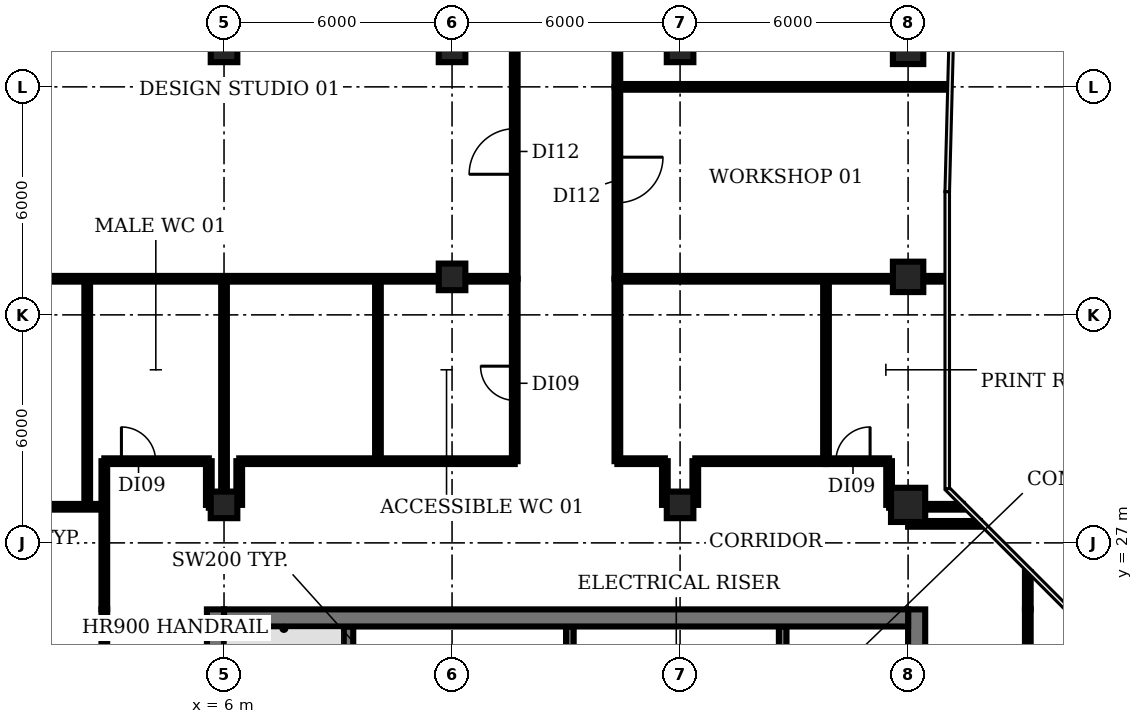
"""IFC4 building model, lengths in metres.
Left out: names, types, materials, properties, quantities, classifications, styles, units other than length and angle.
Written with IfcOpenShell. Run it as: python <this file> out.ifc"""

import sys

from ifc_helpers import new_model, si_unit, direction, frame, frame_2d, origin, origin_2d, place, context, subcontext, project, spatial, rectangle, circle, extrude, element, fill, save


model = new_model("IFC4")
c1 = context("Model", 3, precision=1e-05, world=origin(), true_north=direction((0.0, 1.0)))
c2 = subcontext(c1, "Body", "Model", "MODEL_VIEW")
j1 = project(units=[si_unit("LENGTHUNIT", "METRE"), si_unit("PLANEANGLEUNIT", "RADIAN")], contexts=[c1])
p1 = place(None, origin())
s1 = spatial("IfcSite", under=j1, at=p1, CompositionType="ELEMENT")
p2 = place(p1, origin())
s2 = spatial("IfcBuilding", under=s1, at=p2, CompositionType="ELEMENT")
p3 = place(p2, frame((0.0, 0.0, 234.8)))
s3 = spatial("IfcBuildingStorey", under=s2, at=p3, CompositionType="ELEMENT", Elevation=234.8)
for number, where, z_axis, x_axis in (
    (1, (6.0, 28.0, 0.0), (0.0, 0.0, 1.0), (1.0, 0.0, 0.0)),
    (2, (6.0, 40.0, 0.0), (0.0, 0.0, 1.0), (1.0, 0.0, 0.0)),
    (3, (12.0, 34.0, 0.0), (0.0, 0.0, 1.0), (1.0, 0.0, 0.0)),
    (4, (12.0, 40.0, 0.0), (0.0, 0.0, 1.0), (1.0, 0.0, 0.0)),
    (5, (18.0, 28.0, 0.0), (0.0, 0.0, 1.0), (1.0, 0.0, 0.0)),
    (6, (18.0, 40.0, 0.0), (0.0, 0.0, 1.0), (1.0, 0.0, 0.0)),
):
    element("IfcColumn", number, at=place(p3, frame(where, z_axis=z_axis, x_axis=x_axis)), inside=s3, PredefinedType="COLUMN", context=c2, shape_type="SweptSolid", body=[
        extrude(rectangle(XDim=0.7, YDim=0.7, at=origin_2d()), origin(), (0.0, 0.0, 1.0), 3.85),
    ])
p4 = place(p3, frame((24.0, 28.0, 0.0), z_axis=(0.0, 0.0, 1.0), x_axis=(1.0, 0.0, 0.0)))
e7 = element("IfcColumn", 7, at=p4, inside=s3, PredefinedType="COLUMN", context=c2, shape_type="SweptSolid", body=[
    extrude(circle(Radius=0.45, at=origin_2d()), origin(), (0.0, 0.0, 1.0), 3.85),
])
for number, where, z_axis, x_axis in (
    (8, (24.0, 34.0, 0.0), (0.0, 0.0, 1.0), (1.0, 0.0, 0.0)),
    (9, (24.0, 40.0, 0.0), (0.0, 0.0, 1.0), (1.0, 0.0, 0.0)),
):
    element("IfcColumn", number, at=place(p3, frame(where, z_axis=z_axis, x_axis=x_axis)), inside=s3, PredefinedType="COLUMN", context=c2, shape_type="SweptSolid", body=[
        extrude(rectangle(XDim=0.8, YDim=0.8, at=origin_2d()), origin(), (0.0, 0.0, 1.0), 3.85),
    ])
p5 = place(p3, frame((9.275, 18.375, 0.0), z_axis=(0.0, 0.0, 1.0), x_axis=(0.0, 1.0, 0.0)))
e10 = element("IfcWall", 10, at=p5, inside=s3, PredefinedType="SHEAR", context=c2, shape_type="SweptSolid", body=[
    extrude(rectangle(XDim=6.425, YDim=0.25, at=frame_2d((3.212, 0.0))), origin(), (0.0, 0.0, 1.0), 3.85),
])
for number, where, z_axis, x_axis in (
    (11, (15.1, 22.9, 0.0), (0.0, 0.0, 1.0), (0.0, 1.0, 0.0)),
    (12, (20.7, 22.9, 0.0), (0.0, 0.0, 1.0), (0.0, 1.0, 0.0)),
):
    element("IfcWall", number, at=place(p3, frame(where, z_axis=z_axis, x_axis=x_axis)), inside=s3, PredefinedType="SHEAR", context=c2, shape_type="SweptSolid", body=[
        extrude(rectangle(XDim=1.9, YDim=0.2, at=frame_2d((0.95, 0.0))), origin(), (0.0, 0.0, 1.0), 3.85),
    ])
p6 = place(p3, frame((5.775, 4.42, 0.0), z_axis=(0.0, 0.0, 1.0), x_axis=(0.0, 1.0, 0.0)))
e13 = element("IfcWall", 13, at=p6, inside=s3, PredefinedType="SHEAR", context=c2, shape_type="SweptSolid", body=[
    extrude(rectangle(XDim=20.83, YDim=0.45, at=frame_2d((10.415, 0.0))), origin(), (0.0, 0.0, 1.0), 3.85),
])
p7 = place(p6, frame((1.23, 0.0, 0.0)))
e14 = element("IfcOpeningElement", 14, at=p7, cuts=e13, PredefinedType="OPENING", context=c2, shape_type="SweptSolid", body=[
    extrude(rectangle(XDim=1.5, YDim=2.1, at=frame_2d((0.75, 1.05))), frame((0.0, 0.235, 0.0), z_axis=(0.0, -1.0, 0.0), x_axis=(1.0, 0.0, 0.0)), (0.0, 0.0, 1.0), 0.47),
])
p8 = place(p6, frame((7.68, 0.0, 0.0)))
e15 = element("IfcOpeningElement", 15, at=p8, cuts=e13, PredefinedType="OPENING", context=c2, shape_type="SweptSolid", body=[
    extrude(rectangle(XDim=1.2, YDim=2.1, at=frame_2d((0.6, 1.05))), frame((0.0, 0.235, 0.0), z_axis=(0.0, -1.0, 0.0), x_axis=(1.0, 0.0, 0.0)), (0.0, 0.0, 1.0), 0.47),
])
p9 = place(p6, frame((14.23, 0.0, 0.0)))
e16 = element("IfcOpeningElement", 16, at=p9, cuts=e13, PredefinedType="OPENING", context=c2, shape_type="SweptSolid", body=[
    extrude(rectangle(XDim=1.2, YDim=2.1, at=frame_2d((0.6, 1.05))), frame((0.0, 0.235, 0.0), z_axis=(0.0, -1.0, 0.0), x_axis=(1.0, 0.0, 0.0)), (0.0, 0.0, 1.0), 0.47),
])
p10 = place(p3, frame((24.225, 25.25, 0.0), z_axis=(0.0, 0.0, 1.0), x_axis=(0.0, -1.0, 0.0)))
e17 = element("IfcWall", 17, at=p10, inside=s3, PredefinedType="SHEAR", context=c2, shape_type="SweptSolid", body=[
    extrude(rectangle(XDim=20.83, YDim=0.45, at=frame_2d((10.415, 0.0))), origin(), (0.0, 0.0, 1.0), 3.85),
])
p11 = place(p10, frame((18.1, 0.0, 0.0)))
e18 = element("IfcOpeningElement", 18, at=p11, cuts=e17, PredefinedType="OPENING", context=c2, shape_type="SweptSolid", body=[
    extrude(rectangle(XDim=1.5, YDim=2.1, at=frame_2d((0.75, 1.05))), frame((0.0, 0.235, 0.0), z_axis=(0.0, -1.0, 0.0), x_axis=(1.0, 0.0, 0.0)), (0.0, 0.0, 1.0), 0.47),
])
p12 = place(p10, frame((12.0, 0.0, 0.0)))
e19 = element("IfcOpeningElement", 19, at=p12, cuts=e17, PredefinedType="OPENING", context=c2, shape_type="SweptSolid", body=[
    extrude(rectangle(XDim=0.9, YDim=2.1, at=frame_2d((0.45, 1.05))), frame((0.0, 0.235, 0.0), z_axis=(0.0, -1.0, 0.0), x_axis=(1.0, 0.0, 0.0)), (0.0, 0.0, 1.0), 0.47),
])
p13 = place(p10, frame((6.0, 0.0, 0.0)))
e20 = element("IfcOpeningElement", 20, at=p13, cuts=e17, PredefinedType="OPENING", context=c2, shape_type="SweptSolid", body=[
    extrude(rectangle(XDim=2.0, YDim=2.1, at=frame_2d((1.0, 1.05))), frame((0.0, 0.235, 0.0), z_axis=(0.0, -1.0, 0.0), x_axis=(1.0, 0.0, 0.0)), (0.0, 0.0, 1.0), 0.47),
])
p14 = place(p3, frame((6.0, 25.025, 0.0), z_axis=(0.0, 0.0, 1.0), x_axis=(1.0, 0.0, 0.0)))
e21 = element("IfcWall", 21, at=p14, inside=s3, PredefinedType="SHEAR", context=c2, shape_type="SweptSolid", body=[
    extrude(rectangle(XDim=18.0, YDim=0.45, at=frame_2d((9.0, 0.0))), origin(), (0.0, 0.0, 1.0), 3.85),
])
p15 = place(p3, frame((-1.21, 27.95, 0.0), z_axis=(0.0, 0.0, 1.0), x_axis=(1.0, 0.0, 0.0)))
e22 = element("IfcWall", 22, at=p15, inside=s3, PredefinedType="PARTITIONING", context=c2, shape_type="SweptSolid", body=[
    extrude(rectangle(XDim=4.06, YDim=0.15, at=frame_2d((2.03, 0.0))), origin(), (0.0, 0.0, 1.0), 2.88),
])
p16 = place(p3, frame((-1.05, 33.95, 0.0), z_axis=(0.0, 0.0, 1.0), x_axis=(1.0, 0.0, 0.0)))
e23 = element("IfcWall", 23, at=p16, inside=s3, PredefinedType="PARTITIONING", context=c2, shape_type="SweptSolid", body=[
    extrude(rectangle(XDim=14.7, YDim=0.15, at=frame_2d((7.35, 0.0))), origin(), (0.0, 0.0, 1.0), 2.88),
])
p17 = place(p3, frame((2.4, 27.95, 0.0), z_axis=(0.0, 0.0, 1.0), x_axis=(0.0, 1.0, 0.0)))
e24 = element("IfcWall", 24, at=p17, inside=s3, PredefinedType="PARTITIONING", context=c2, shape_type="SweptSolid", body=[
    extrude(rectangle(XDim=6.0, YDim=0.15, at=frame_2d((3.0, 0.0))), origin(), (0.0, 0.0, 1.0), 2.88),
])
p18 = place(p3, frame((2.85, 5.23, 0.0), z_axis=(0.0, 0.0, 1.0), x_axis=(0.0, 1.0, 0.0)))
e25 = element("IfcWall", 25, at=p18, inside=s3, PredefinedType="PARTITIONING", context=c2, shape_type="SweptSolid", body=[
    extrude(rectangle(XDim=20.02, YDim=0.15, at=frame_2d((10.01, 0.0))), origin(), (0.0, 0.0, 1.0), 2.88),
])
p19 = place(p18, frame((9.02, 0.0, 0.0)))
e26 = element("IfcOpeningElement", 26, at=p19, cuts=e25, PredefinedType="OPENING", context=c2, shape_type="SweptSolid", body=[
    extrude(rectangle(XDim=1.2, YDim=2.1, at=frame_2d((0.6, 1.05))), frame((0.0, 0.085, 0.0), z_axis=(0.0, -1.0, 0.0), x_axis=(1.0, 0.0, 0.0)), (0.0, 0.0, 1.0), 0.17),
])
p20 = place(p3, frame((2.85, 25.25, 0.0), z_axis=(0.0, 0.0, 1.0), x_axis=(0.0, 1.0, 0.0)))
e27 = element("IfcWall", 27, at=p20, inside=s3, PredefinedType="PARTITIONING", context=c2, shape_type="SweptSolid", body=[
    extrude(rectangle(XDim=3.9, YDim=0.15, at=frame_2d((1.95, 0.0))), origin(), (0.0, 0.0, 1.0), 2.88),
])
p21 = place(p3, frame((2.85, 29.15, 0.0), z_axis=(0.0, 0.0, 1.0), x_axis=(1.0, 0.0, 0.0)))
e28 = element("IfcWall", 28, at=p21, inside=s3, PredefinedType="PARTITIONING", context=c2, shape_type="SweptSolid", body=[
    extrude(rectangle(XDim=2.75, YDim=0.15, at=frame_2d((1.375, 0.0))), origin(), (0.0, 0.0, 1.0), 2.88),
])
p22 = place(p21, frame((0.45, 0.0, 0.0)))
e29 = element("IfcOpeningElement", 29, at=p22, cuts=e28, PredefinedType="OPENING", context=c2, shape_type="SweptSolid", body=[
    extrude(rectangle(XDim=0.9, YDim=2.1, at=frame_2d((0.45, 1.05))), frame((0.0, 0.085, 0.0), z_axis=(0.0, -1.0, 0.0), x_axis=(1.0, 0.0, 0.0)), (0.0, 0.0, 1.0), 0.17),
])
p23 = place(p3, frame((5.6, 28.0, 0.0), z_axis=(0.0, 0.0, 1.0), x_axis=(0.0, 1.0, 0.0)))
e30 = element("IfcWall", 30, at=p23, inside=s3, PredefinedType="PARTITIONING", context=c2, shape_type="SweptSolid", body=[
    extrude(rectangle(XDim=1.15, YDim=0.15, at=frame_2d((0.575, 0.0))), origin(), (0.0, 0.0, 1.0), 2.88),
])
p24 = place(p3, frame((5.6, 28.0, 0.0), z_axis=(0.0, 0.0, 1.0), x_axis=(1.0, 0.0, 0.0)))
e31 = element("IfcWall", 31, at=p24, inside=s3, PredefinedType="PARTITIONING", context=c2, shape_type="SweptSolid", body=[
    extrude(rectangle(XDim=0.4, YDim=0.15, at=frame_2d((0.2, 0.0))), origin(), (0.0, 0.0, 1.0), 2.88),
])
p25 = place(p3, frame((6.0, 28.0, 0.0), z_axis=(0.0, 0.0, 1.0), x_axis=(0.0, 1.0, 0.0)))
e32 = element("IfcWall", 32, at=p25, inside=s3, PredefinedType="PARTITIONING", context=c2, shape_type="SweptSolid", body=[
    extrude(rectangle(XDim=5.95, YDim=0.15, at=frame_2d((2.975, 0.0))), origin(), (0.0, 0.0, 1.0), 2.88),
])
p26 = place(p3, frame((6.4, 28.0, 0.0), z_axis=(0.0, 0.0, 1.0), x_axis=(0.0, 1.0, 0.0)))
e33 = element("IfcWall", 33, at=p26, inside=s3, PredefinedType="PARTITIONING", context=c2, shape_type="SweptSolid", body=[
    extrude(rectangle(XDim=1.15, YDim=0.15, at=frame_2d((0.575, 0.0))), origin(), (0.0, 0.0, 1.0), 2.88),
])
p27 = place(p3, frame((6.4, 29.15, 0.0), z_axis=(0.0, 0.0, 1.0), x_axis=(1.0, 0.0, 0.0)))
e34 = element("IfcWall", 34, at=p27, inside=s3, PredefinedType="PARTITIONING", context=c2, shape_type="SweptSolid", body=[
    extrude(rectangle(XDim=7.25, YDim=0.15, at=frame_2d((3.625, 0.0))), origin(), (0.0, 0.0, 1.0), 2.88),
])
p28 = place(p3, frame((10.05, 29.15, 0.0), z_axis=(0.0, 0.0, 1.0), x_axis=(0.0, 1.0, 0.0)))
e35 = element("IfcWall", 35, at=p28, inside=s3, PredefinedType="PARTITIONING", context=c2, shape_type="SweptSolid", body=[
    extrude(rectangle(XDim=4.8, YDim=0.15, at=frame_2d((2.4, 0.0))), origin(), (0.0, 0.0, 1.0), 2.88),
])
p29 = place(p3, frame((13.65, 29.15, 0.0), z_axis=(0.0, 0.0, 1.0), x_axis=(0.0, 1.0, 0.0)))
e36 = element("IfcWall", 36, at=p29, inside=s3, PredefinedType="PARTITIONING", context=c2, shape_type="SweptSolid", body=[
    extrude(rectangle(XDim=4.8, YDim=0.15, at=frame_2d((2.4, 0.0))), origin(), (0.0, 0.0, 1.0), 2.88),
])
p30 = place(p29, frame((1.6, 0.0, 0.0)))
e37 = element("IfcOpeningElement", 37, at=p30, cuts=e36, PredefinedType="OPENING", context=c2, shape_type="SweptSolid", body=[
    extrude(rectangle(XDim=0.9, YDim=2.1, at=frame_2d((0.45, 1.05))), frame((0.0, 0.085, 0.0), z_axis=(0.0, -1.0, 0.0), x_axis=(1.0, 0.0, 0.0)), (0.0, 0.0, 1.0), 0.17),
])
p31 = place(p3, frame((13.65, 33.95, 0.0), z_axis=(0.0, 0.0, 1.0), x_axis=(0.0, 1.0, 0.0)))
e38 = element("IfcWall", 38, at=p31, inside=s3, PredefinedType="PARTITIONING", context=c2, shape_type="SweptSolid", body=[
    extrude(rectangle(XDim=11.05, YDim=0.15, at=frame_2d((5.525, 0.0))), origin(), (0.0, 0.0, 1.0), 2.88),
])
p32 = place(p31, frame((2.75, 0.0, 0.0)))
e39 = element("IfcOpeningElement", 39, at=p32, cuts=e38, PredefinedType="OPENING", context=c2, shape_type="SweptSolid", body=[
    extrude(rectangle(XDim=1.2, YDim=2.1, at=frame_2d((0.6, 1.05))), frame((0.0, 0.085, 0.0), z_axis=(0.0, -1.0, 0.0), x_axis=(1.0, 0.0, 0.0)), (0.0, 0.0, 1.0), 0.17),
])
p33 = place(p3, frame((16.35, 29.15, 0.0), z_axis=(0.0, 0.0, 1.0), x_axis=(0.0, 1.0, 0.0)))
e40 = element("IfcWall", 40, at=p33, inside=s3, PredefinedType="PARTITIONING", context=c2, shape_type="SweptSolid", body=[
    extrude(rectangle(XDim=4.8, YDim=0.15, at=frame_2d((2.4, 0.0))), origin(), (0.0, 0.0, 1.0), 2.88),
])
p34 = place(p3, frame((16.35, 29.15, 0.0), z_axis=(0.0, 0.0, 1.0), x_axis=(1.0, 0.0, 0.0)))
e41 = element("IfcWall", 41, at=p34, inside=s3, PredefinedType="PARTITIONING", context=c2, shape_type="SweptSolid", body=[
    extrude(rectangle(XDim=1.25, YDim=0.15, at=frame_2d((0.625, 0.0))), origin(), (0.0, 0.0, 1.0), 2.88),
])
p35 = place(p3, frame((16.35, 33.95, 0.0), z_axis=(0.0, 0.0, 1.0), x_axis=(1.0, 0.0, 0.0)))
e42 = element("IfcWall", 42, at=p35, inside=s3, PredefinedType="PARTITIONING", context=c2, shape_type="SweptSolid", body=[
    extrude(rectangle(XDim=8.63, YDim=0.15, at=frame_2d((4.315, 0.0))), origin(), (0.0, 0.0, 1.0), 2.88),
])
p36 = place(p3, frame((16.35, 39.0, 0.0), z_axis=(0.0, 0.0, 1.0), x_axis=(0.0, -1.0, 0.0)))
e43 = element("IfcWall", 43, at=p36, inside=s3, PredefinedType="PARTITIONING", context=c2, shape_type="SweptSolid", body=[
    extrude(rectangle(XDim=5.05, YDim=0.15, at=frame_2d((2.525, 0.0))), origin(), (0.0, 0.0, 1.0), 2.88),
])
p37 = place(p36, frame((1.85, 0.0, 0.0)))
e44 = element("IfcOpeningElement", 44, at=p37, cuts=e43, PredefinedType="OPENING", context=c2, shape_type="SweptSolid", body=[
    extrude(rectangle(XDim=1.2, YDim=2.1, at=frame_2d((0.6, 1.05))), frame((0.0, 0.085, 0.0), z_axis=(0.0, -1.0, 0.0), x_axis=(1.0, 0.0, 0.0)), (0.0, 0.0, 1.0), 0.17),
])
p38 = place(p3, frame((16.35, 39.0, 0.0), z_axis=(0.0, 0.0, 1.0), x_axis=(0.0, 1.0, 0.0)))
e45 = element("IfcWall", 45, at=p38, inside=s3, PredefinedType="PARTITIONING", context=c2, shape_type="SweptSolid", body=[
    extrude(rectangle(XDim=12.0, YDim=0.15, at=frame_2d((6.0, 0.0))), origin(), (0.0, 0.0, 1.0), 2.88),
])
p39 = place(p38, frame((5.3, 0.0, 0.0)))
e46 = element("IfcOpeningElement", 46, at=p39, cuts=e45, PredefinedType="OPENING", context=c2, shape_type="SweptSolid", body=[
    extrude(rectangle(XDim=1.2, YDim=2.1, at=frame_2d((0.6, 1.05))), frame((0.0, 0.085, 0.0), z_axis=(0.0, -1.0, 0.0), x_axis=(1.0, 0.0, 0.0)), (0.0, 0.0, 1.0), 0.17),
])
p40 = place(p3, frame((16.35, 39.0, 0.0), z_axis=(0.0, 0.0, 1.0), x_axis=(1.0, 0.0, 0.0)))
e47 = element("IfcWall", 47, at=p40, inside=s3, PredefinedType="PARTITIONING", context=c2, shape_type="SweptSolid", body=[
    extrude(rectangle(XDim=8.7, YDim=0.15, at=frame_2d((4.35, 0.0))), origin(), (0.0, 0.0, 1.0), 2.88),
])
for number, where, z_axis, x_axis in (
    (48, (17.6, 28.0, 0.0), (0.0, 0.0, 1.0), (0.0, 1.0, 0.0)),
    (49, (18.4, 28.0, 0.0), (0.0, 0.0, 1.0), (0.0, 1.0, 0.0)),
):
    element("IfcWall", number, at=place(p3, frame(where, z_axis=z_axis, x_axis=x_axis)), inside=s3, PredefinedType="PARTITIONING", context=c2, shape_type="SweptSolid", body=[
        extrude(rectangle(XDim=1.15, YDim=0.15, at=frame_2d((0.575, 0.0))), origin(), (0.0, 0.0, 1.0), 2.88),
    ])
p41 = place(p3, frame((18.4, 29.15, 0.0), z_axis=(0.0, 0.0, 1.0), x_axis=(1.0, 0.0, 0.0)))
e50 = element("IfcWall", 50, at=p41, inside=s3, PredefinedType="PARTITIONING", context=c2, shape_type="SweptSolid", body=[
    extrude(rectangle(XDim=3.44, YDim=0.15, at=frame_2d((1.72, 0.0))), origin(), (0.0, 0.0, 1.0), 2.88),
])
p42 = place(p3, frame((21.84, 29.15, 0.0), z_axis=(0.0, 0.0, 1.0), x_axis=(0.0, 1.0, 0.0)))
e51 = element("IfcWall", 51, at=p42, inside=s3, PredefinedType="PARTITIONING", context=c2, shape_type="SweptSolid", body=[
    extrude(rectangle(XDim=4.8, YDim=0.15, at=frame_2d((2.4, 0.0))), origin(), (0.0, 0.0, 1.0), 2.88),
])
p43 = place(p3, frame((21.84, 29.15, 0.0), z_axis=(0.0, 0.0, 1.0), x_axis=(1.0, 0.0, 0.0)))
e52 = element("IfcWall", 52, at=p43, inside=s3, PredefinedType="PARTITIONING", context=c2, shape_type="SweptSolid", body=[
    extrude(rectangle(XDim=1.66, YDim=0.15, at=frame_2d((0.83, 0.0))), origin(), (0.0, 0.0, 1.0), 2.88),
])
p44 = place(p43, frame((0.26, 0.0, 0.0)))
e53 = element("IfcOpeningElement", 53, at=p44, cuts=e52, PredefinedType="OPENING", context=c2, shape_type="SweptSolid", body=[
    extrude(rectangle(XDim=0.9, YDim=2.1, at=frame_2d((0.45, 1.05))), frame((0.0, 0.085, 0.0), z_axis=(0.0, -1.0, 0.0), x_axis=(1.0, 0.0, 0.0)), (0.0, 0.0, 1.0), 0.17),
])
p45 = place(p3, frame((23.5, 28.0, 0.0), z_axis=(0.0, 0.0, 1.0), x_axis=(0.0, 1.0, 0.0)))
e54 = element("IfcWall", 54, at=p45, inside=s3, PredefinedType="PARTITIONING", context=c2, shape_type="SweptSolid", body=[
    extrude(rectangle(XDim=1.15, YDim=0.15, at=frame_2d((0.575, 0.0))), origin(), (0.0, 0.0, 1.0), 2.88),
])
p46 = place(p3, frame((23.5, 28.0, 0.0), z_axis=(0.0, 0.0, 1.0), x_axis=(1.0, 0.0, 0.0)))
e55 = element("IfcWall", 55, at=p46, inside=s3, PredefinedType="PARTITIONING", context=c2, shape_type="SweptSolid", body=[
    extrude(rectangle(XDim=0.5, YDim=0.15, at=frame_2d((0.25, 0.0))), origin(), (0.0, 0.0, 1.0), 2.88),
])
p47 = place(p3, frame((24.0, 27.5, 0.0), z_axis=(0.0, 0.0, 1.0), x_axis=(1.0, 0.0, 0.0)))
e56 = element("IfcWall", 56, at=p47, inside=s3, PredefinedType="PARTITIONING", context=c2, shape_type="SweptSolid", body=[
    extrude(rectangle(XDim=1.89, YDim=0.15, at=frame_2d((0.945, 0.0))), origin(), (0.0, 0.0, 1.0), 2.88),
])
p48 = place(p3, frame((24.0, 27.95, 0.0), z_axis=(0.0, 0.0, 1.0), x_axis=(1.0, 0.0, 0.0)))
e57 = element("IfcWall", 57, at=p48, inside=s3, PredefinedType="PARTITIONING", context=c2, shape_type="SweptSolid", body=[
    extrude(rectangle(XDim=1.44, YDim=0.15, at=frame_2d((0.72, 0.0))), origin(), (0.0, 0.0, 1.0), 2.88),
])
p49 = place(p3, frame((27.15, 25.25, 0.0), z_axis=(0.0, 0.0, 1.0), x_axis=(0.0, -1.0, 0.0)))
e58 = element("IfcWall", 58, at=p49, inside=s3, PredefinedType="PARTITIONING", context=c2, shape_type="SweptSolid", body=[
    extrude(rectangle(XDim=5.85, YDim=0.15, at=frame_2d((2.925, 0.0))), origin(), (0.0, 0.0, 1.0), 2.88),
])
p50 = place(p49, frame((1.65, 0.0, 0.0)))
e59 = element("IfcOpeningElement", 59, at=p50, cuts=e58, PredefinedType="OPENING", context=c2, shape_type="SweptSolid", body=[
    extrude(rectangle(XDim=1.0, YDim=2.1, at=frame_2d((0.5, 1.05))), frame((0.0, 0.085, 0.0), z_axis=(0.0, -1.0, 0.0), x_axis=(1.0, 0.0, 0.0)), (0.0, 0.0, 1.0), 0.17),
])
p51 = place(p3, frame((27.15, 25.25, 0.0), z_axis=(0.0, 0.0, 1.0), x_axis=(0.0, 1.0, 0.0)))
e60 = element("IfcWall", 60, at=p51, inside=s3, PredefinedType="PARTITIONING", context=c2, shape_type="SweptSolid", body=[
    extrude(rectangle(XDim=0.98, YDim=0.15, at=frame_2d((0.49, 0.0))), origin(), (0.0, 0.0, 1.0), 2.88),
])
p52 = place(p22, origin())
e61 = element("IfcDoor", 61, at=p52, inside=s3, OperationType="SINGLE_SWING_LEFT", PredefinedType="DOOR", context=c2, shape_type="SweptSolid", body=[
    extrude(rectangle(XDim=0.9, YDim=2.1, at=frame_2d((0.45, 1.05))), frame((0.0, 0.025, 0.0), z_axis=(0.0, -1.0, 0.0), x_axis=(1.0, 0.0, 0.0)), (0.0, 0.0, 1.0), 0.05),
])
fill(e29, e61)
p53 = place(p30, origin())
e62 = element("IfcDoor", 62, at=p53, inside=s3, OperationType="SINGLE_SWING_RIGHT", PredefinedType="DOOR", context=c2, shape_type="SweptSolid", body=[
    extrude(rectangle(XDim=0.9, YDim=2.1, at=frame_2d((0.45, 1.05))), frame((0.0, 0.025, 0.0), z_axis=(0.0, -1.0, 0.0), x_axis=(1.0, 0.0, 0.0)), (0.0, 0.0, 1.0), 0.05),
])
fill(e37, e62)
p54 = place(p32, origin())
e63 = element("IfcDoor", 63, at=p54, inside=s3, OperationType="SINGLE_SWING_LEFT", PredefinedType="DOOR", context=c2, shape_type="SweptSolid", body=[
    extrude(rectangle(XDim=1.2, YDim=2.1, at=frame_2d((0.6, 1.05))), frame((0.0, 0.025, 0.0), z_axis=(0.0, -1.0, 0.0), x_axis=(1.0, 0.0, 0.0)), (0.0, 0.0, 1.0), 0.05),
])
fill(e39, e63)
p55 = place(p37, origin())
e64 = element("IfcDoor", 64, at=p55, inside=s3, OperationType="SINGLE_SWING_LEFT", PredefinedType="DOOR", context=c2, shape_type="SweptSolid", body=[
    extrude(rectangle(XDim=1.2, YDim=2.1, at=frame_2d((0.6, 1.05))), frame((0.0, 0.025, 0.0), z_axis=(0.0, -1.0, 0.0), x_axis=(1.0, 0.0, 0.0)), (0.0, 0.0, 1.0), 0.05),
])
fill(e44, e64)
p56 = place(p44, origin())
e65 = element("IfcDoor", 65, at=p56, inside=s3, OperationType="SINGLE_SWING_RIGHT", PredefinedType="DOOR", context=c2, shape_type="SweptSolid", body=[
    extrude(rectangle(XDim=0.9, YDim=2.1, at=frame_2d((0.45, 1.05))), frame((0.0, 0.025, 0.0), z_axis=(0.0, -1.0, 0.0), x_axis=(1.0, 0.0, 0.0)), (0.0, 0.0, 1.0), 0.05),
])
fill(e53, e65)
save(model, sys.argv[1])
